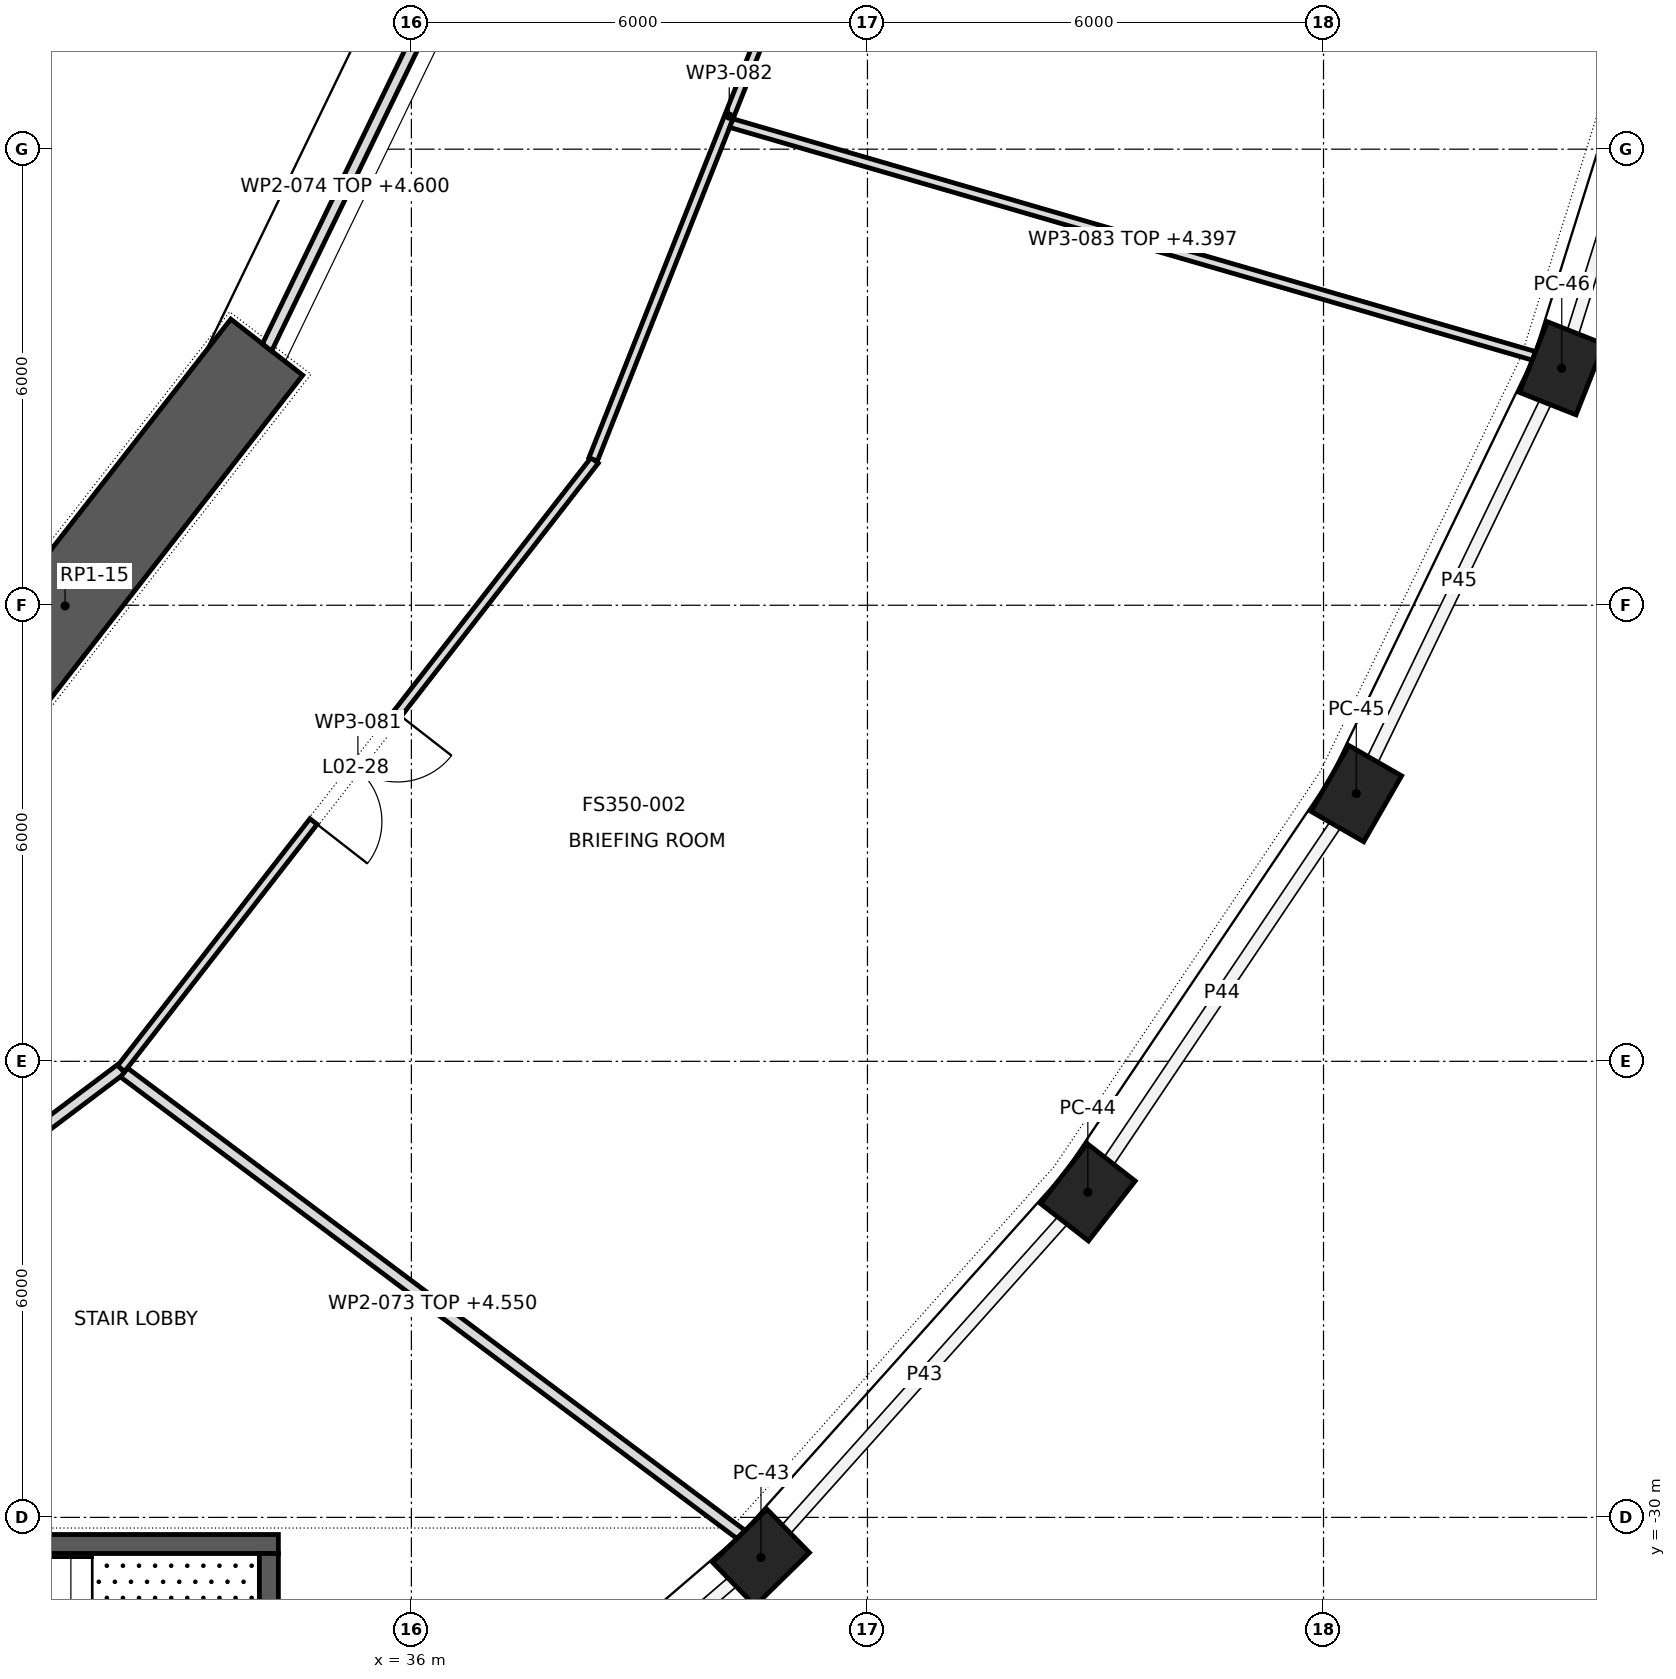
"""IFC4 building model, lengths in metres.
Left out: names, types, materials, properties, quantities, classifications, styles, units other than length and angle.
Written with IfcOpenShell. Run it as: python <this file> out.ifc"""

import sys

from ifc_helpers import new_model, si_unit, direction, frame, frame_2d, origin, origin_2d, place, context, subcontext, project, spatial, polyline, rectangle, outline, extrude, element, fill, save


model = new_model("IFC4")
c1 = context("Model", 3, precision=1e-05, world=origin(), true_north=direction((0.0, 1.0)))
c2 = subcontext(c1, "Body", "Model", "MODEL_VIEW")
j1 = project(units=[si_unit("LENGTHUNIT", "METRE"), si_unit("PLANEANGLEUNIT", "RADIAN")], contexts=[c1])
p1 = place(None, origin())
s1 = spatial("IfcSite", under=j1, at=p1, CompositionType="ELEMENT")
p2 = place(p1, origin())
s2 = spatial("IfcBuilding", under=s1, at=p2, CompositionType="ELEMENT")
p3 = place(p2, frame((0.0, 0.0, 12.5)))
s3 = spatial("IfcBuildingStorey", under=s2, at=p3, CompositionType="ELEMENT", Elevation=12.5)
for number, where, z_axis, x_axis in (
    (1, (40.599, -30.528, 0.0), (0.0, 0.0, 1.0), (0.715, 0.699, 0.0)),
    (2, (44.899, -25.723, 0.0), (0.0, 0.0, 1.0), (0.615, 0.789, 0.0)),
    (3, (48.431, -20.478, 0.0), (0.0, 0.0, 1.0), (0.499, 0.867, 0.0)),
    (4, (51.134, -14.883, 0.0), (0.0, 0.0, 1.0), (0.368, 0.93, 0.0)),
):
    element("IfcColumn", number, at=place(p3, frame(where, z_axis=z_axis, x_axis=x_axis)), inside=s3, PredefinedType="COLUMN", context=c2, shape_type="SweptSolid", body=[
        extrude(rectangle(XDim=1.0, YDim=0.8, at=origin_2d()), origin(), (0.0, 0.0, 1.0), 5.5),
    ])
p4 = place(p3, frame((28.79, -21.412, 0.0), z_axis=(0.0, 0.0, 1.0), x_axis=(0.614825322247, 0.788663314174, 0.0)))
e5 = element("IfcWall", 5, at=p4, inside=s3, PredefinedType="SHEAR", context=c2, shape_type="SweptSolid", body=[
    extrude(rectangle(XDim=8.632, YDim=1.2, at=frame_2d((4.316, 0.0))), origin(), (0.0, 0.0, 1.0), 5.5),
])
p5 = place(p3, frame((25.75, -30.35, 0.0), z_axis=(0.0, 0.0, 1.0), x_axis=(1.0, 0.0, 0.0)))
e6 = element("IfcWall", 6, at=p5, inside=s3, PredefinedType="SHEAR", context=c2, shape_type="SweptSolid", body=[
    extrude(rectangle(XDim=8.5, YDim=0.25, at=frame_2d((4.25, 0.0))), origin(), (0.0, 0.0, 1.0), 5.15),
])
p6 = place(p3, frame((34.125, -33.525, 0.0), z_axis=(0.0, 0.0, 1.0), x_axis=(0.0, 1.0, 0.0)))
e7 = element("IfcWall", 7, at=p6, inside=s3, PredefinedType="SHEAR", context=c2, shape_type="SweptSolid", body=[
    extrude(rectangle(XDim=3.05, YDim=0.25, at=frame_2d((1.525, 0.0))), origin(), (0.0, 0.0, 1.0), 5.15),
])
p7 = place(p3, frame((32.184, -24.099, 0.0), z_axis=(0.0, 0.0, 1.0), x_axis=(-0.799200371747, -0.601064693523, 0.0)))
e8 = element("IfcWall", 8, at=p7, inside=s3, PredefinedType="PARTITIONING", context=c2, shape_type="SweptSolid", body=[
    extrude(rectangle(XDim=10.415, YDim=0.15, at=frame_2d((5.207, 0.0))), origin(), (0.0, 0.0, 1.0), 5.15),
])
p8 = place(p7, frame((4.367, 0.0, 0.0)))
e9 = element("IfcOpeningElement", 9, at=p8, cuts=e8, PredefinedType="OPENING", context=c2, shape_type="SweptSolid", body=[
    extrude(rectangle(XDim=1.8, YDim=2.1, at=frame_2d((0.9, 1.05))), frame((0.0, 0.087, 0.0), z_axis=(0.0, -1.0, 0.0), x_axis=(1.0, 0.0, 0.0)), (0.0, 0.0, 1.0), 0.174),
])
p9 = place(p3, frame((32.22, -24.147, 0.0), z_axis=(0.0, 0.0, 1.0), x_axis=(0.800470661187, -0.599371938431, 0.0)))
e10 = element("IfcWall", 10, at=p9, inside=s3, PredefinedType="PARTITIONING", context=c2, shape_type="SweptSolid", body=[
    extrude(outline(polyline([(0.0, -0.075), (10.129, -0.075), (10.153, 0.075), (0.0, 0.075), (0.0, -0.075)])), origin(), (0.0, 0.0, 1.0), 4.55),
])
p10 = place(p3, frame((34.101, -14.609, 0.0), z_axis=(0.0, 0.0, 1.0), x_axis=(0.436102687495, 0.899896908518, 0.0)))
e11 = element("IfcWall", 11, at=p10, inside=s3, PredefinedType="PARTITIONING", context=c2, shape_type="SweptSolid", body=[
    extrude(outline(polyline([(-0.016, -0.075), (4.716, -0.075), (4.682, 0.075), (0.016, 0.075), (-0.016, -0.075)])), origin(), (0.0, 0.0, 1.0), 4.6),
])
p11 = place(p3, frame((38.411, -16.094, 0.0), z_axis=(0.0, 0.0, 1.0), x_axis=(-0.614343896728, -0.78903838725, 0.0)))
e12 = element("IfcWall", 12, at=p11, inside=s3, PredefinedType="PARTITIONING", context=c2, shape_type="SweptSolid", body=[
    extrude(rectangle(XDim=10.14, YDim=0.12, at=frame_2d((5.07, 0.0))), origin(), (0.0, 0.0, 1.0), 5.15),
])
p12 = place(p11, frame((4.221, 0.0, 0.0)))
e13 = element("IfcOpeningElement", 13, at=p12, cuts=e12, PredefinedType="OPENING", context=c2, shape_type="SweptSolid", body=[
    extrude(rectangle(XDim=1.8, YDim=2.1, at=frame_2d((0.9, 1.05))), frame((0.0, 0.072, 0.0), z_axis=(0.0, -1.0, 0.0), x_axis=(1.0, 0.0, 0.0)), (0.0, 0.0, 1.0), 0.144),
])
p13 = place(p3, frame((38.392, -16.081, 0.0), z_axis=(0.0, 0.0, 1.0), x_axis=(0.368546722622, 0.929609226097, 0.0)))
e14 = element("IfcWall", 14, at=p13, inside=s3, PredefinedType="PARTITIONING", context=c2, shape_type="SweptSolid", body=[
    extrude(rectangle(XDim=9.715, YDim=0.12, at=frame_2d((4.858, 0.0))), origin(), (0.0, 0.0, 1.0), 5.15),
])
p14 = place(p3, frame((40.209, -11.657, 0.0), z_axis=(0.0, 0.0, 1.0), x_axis=(0.960434781241, -0.278504992743, 0.0)))
e15 = element("IfcWall", 15, at=p14, inside=s3, PredefinedType="PARTITIONING", context=c2, shape_type="SweptSolid", body=[
    extrude(outline(polyline([(-0.006, -0.06), (10.99, -0.06), (11.001, 0.06), (0.006, 0.06), (-0.006, -0.06)])), origin(), (0.0, 0.0, 1.0), 4.397),
])
p15 = place(p12, origin())
e16 = element("IfcDoor", 16, at=p15, inside=s3, OperationType="DOUBLE_DOOR_SINGLE_SWING", PredefinedType="DOOR", context=c2, shape_type="SweptSolid", body=[
    extrude(rectangle(XDim=1.8, YDim=2.1, at=frame_2d((0.9, 1.05))), frame((0.0, 0.025, 0.0), z_axis=(0.0, -1.0, 0.0), x_axis=(1.0, 0.0, 0.0)), (0.0, 0.0, 1.0), 0.05),
])
fill(e13, e16)
save(model, sys.argv[1])
